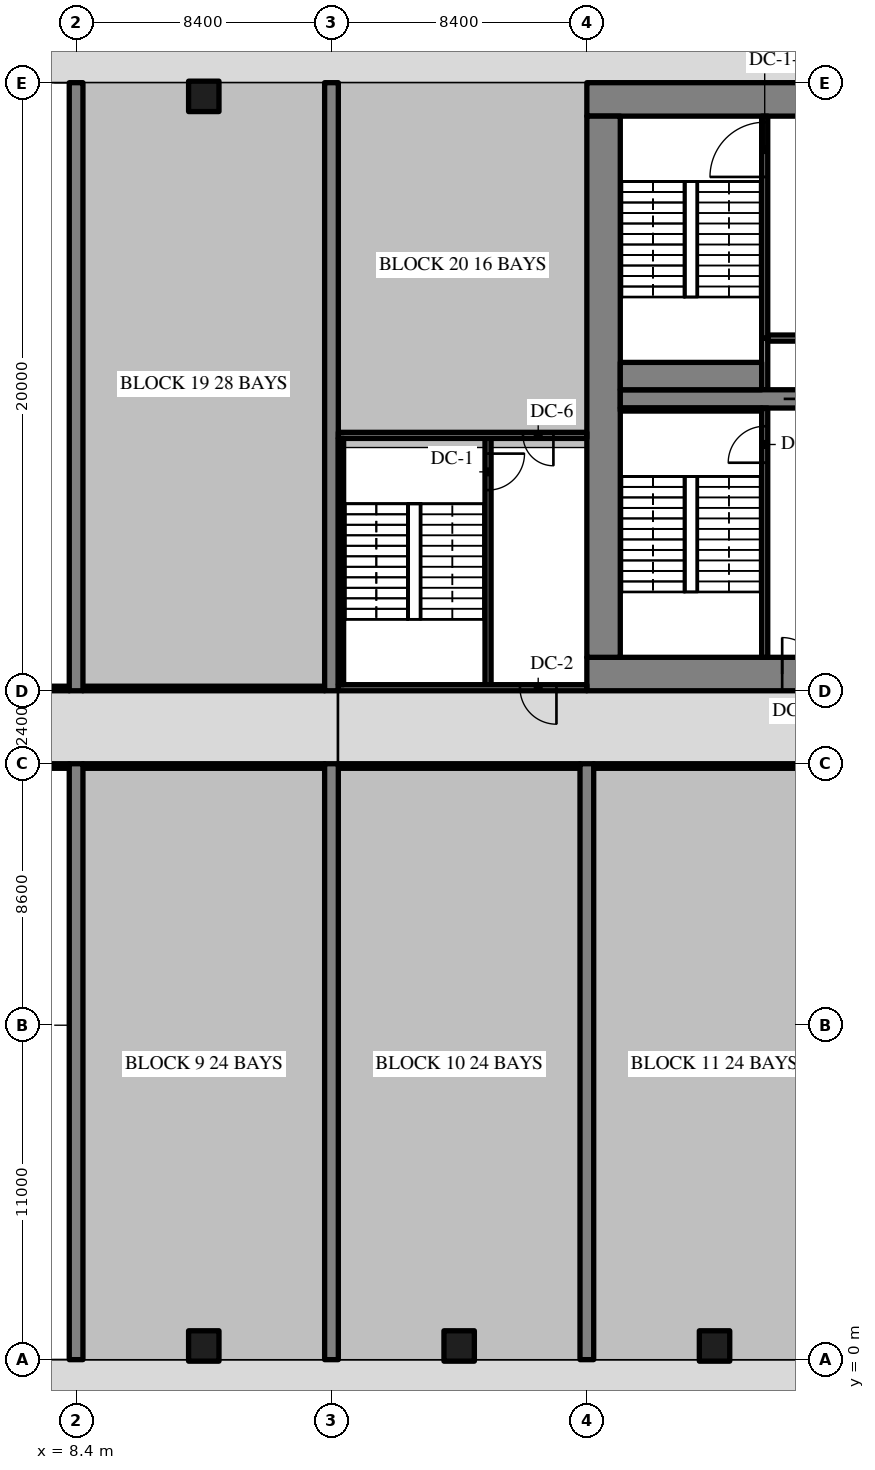
"""IFC4 building model, lengths in metres.
Left out: names, types, materials, properties, quantities, classifications, styles, units other than length and angle.
Written with IfcOpenShell. Run it as: python <this file> out.ifc"""

import sys

from ifc_helpers import new_model, si_unit, direction, frame, frame_2d, origin, origin_2d, place, context, subcontext, project, spatial, rectangle, extrude, source, transform, mapped, element, fill, save


model = new_model("IFC4")
c1 = context("Model", 3, precision=1e-05, world=origin(), true_north=direction((0.0, 1.0)))
c2 = subcontext(c1, "Body", "Model", "MODEL_VIEW")
j1 = project(units=[si_unit("LENGTHUNIT", "METRE"), si_unit("PLANEANGLEUNIT", "RADIAN")], contexts=[c1])
p1 = place(None, origin())
s1 = spatial("IfcSite", under=j1, at=p1, CompositionType="ELEMENT")
p2 = place(p1, origin())
s2 = spatial("IfcBuilding", under=s1, at=p2, CompositionType="ELEMENT")
p3 = place(p2, frame((0.0, 0.0, -9.0)))
s3 = spatial("IfcBuildingStorey", under=s2, at=p3, CompositionType="ELEMENT", Elevation=-9.0)
m1 = source(origin(), c2, "Body", "SweptSolid", [
    extrude(rectangle(XDim=50.4, YDim=1.1, at=frame_2d((25.2, 0.0))), origin(), (0.0, 0.0, 1.0), 4.22),
])
p4 = place(p3, frame((25.2, 22.55, 0.0), z_axis=(0.0, 0.0, 1.0), x_axis=(1.0, 0.0, 0.0)))
e1 = element("IfcWall", 1, at=p4, inside=s3, PredefinedType="SHEAR", context=c2, shape_type="MappedRepresentation", body=[
    mapped(m1, transform((0.0, 0.0, 0.0), scale=1.0)),
])
m2 = source(origin(), c2, "Body", "SweptSolid", [
    extrude(rectangle(XDim=1.8, YDim=2.1, at=frame_2d((0.9, 1.05))), frame((0.0, 0.56, 0.0), z_axis=(0.0, -1.0, 0.0), x_axis=(1.0, 0.0, 0.0)), (0.0, 0.0, 1.0), 1.12),
])
p5 = place(p4, frame((15.9, 0.0, 0.0)))
e2 = element("IfcOpeningElement", 2, at=p5, cuts=e1, PredefinedType="OPENING", context=c2, shape_type="MappedRepresentation", body=[
    mapped(m2, transform((0.0, 0.0, 0.0), scale=1.0)),
])
m3 = source(origin(), c2, "Body", "SweptSolid", [
    extrude(rectangle(XDim=1.2, YDim=2.1, at=frame_2d((0.6, 1.05))), frame((0.0, 0.56, 0.0), z_axis=(0.0, -1.0, 0.0), x_axis=(1.0, 0.0, 0.0)), (0.0, 0.0, 1.0), 1.12),
])
p6 = place(p4, frame((27.0, 0.0, 0.0)))
e3 = element("IfcOpeningElement", 3, at=p6, cuts=e1, PredefinedType="OPENING", context=c2, shape_type="MappedRepresentation", body=[
    mapped(m3, transform((0.0, 0.0, 0.0), scale=1.0)),
])
m4 = source(origin(), c2, "Body", "SweptSolid", [
    extrude(rectangle(XDim=0.9, YDim=2.1, at=frame_2d((0.45, 1.05))), frame((0.0, 0.56, 0.0), z_axis=(0.0, -1.0, 0.0), x_axis=(1.0, 0.0, 0.0)), (0.0, 0.0, 1.0), 1.12),
])
p7 = place(p4, frame((33.75, 0.0, 0.0)))
e4 = element("IfcOpeningElement", 4, at=p7, cuts=e1, PredefinedType="OPENING", context=c2, shape_type="MappedRepresentation", body=[
    mapped(m4, transform((0.0, 0.0, 0.0), scale=1.0)),
])
p8 = place(p4, frame((30.75, 0.0, 0.0)))
e5 = element("IfcOpeningElement", 5, at=p8, cuts=e1, PredefinedType="OPENING", context=c2, shape_type="MappedRepresentation", body=[
    mapped(m4, transform((0.0, 0.0, 0.0), scale=1.0)),
])
p9 = place(p4, frame((38.25, 0.0, 0.0)))
e6 = element("IfcOpeningElement", 6, at=p9, cuts=e1, PredefinedType="OPENING", context=c2, shape_type="MappedRepresentation", body=[
    mapped(m4, transform((0.0, 0.0, 0.0), scale=1.0)),
])
p10 = place(p4, frame((6.425, 0.0, 0.0)))
e7 = element("IfcOpeningElement", 7, at=p10, cuts=e1, PredefinedType="OPENING", context=c2, shape_type="MappedRepresentation", body=[
    mapped(m3, transform((0.0, 0.0, 0.0), scale=1.0)),
])
p11 = place(p4, frame((47.675, 0.0, 0.0)))
e8 = element("IfcOpeningElement", 8, at=p11, cuts=e1, PredefinedType="OPENING", context=c2, shape_type="MappedRepresentation", body=[
    mapped(m3, transform((0.0, 0.0, 0.0), scale=1.0)),
])
p12 = place(p3, frame((25.2, 41.45, 0.0), z_axis=(0.0, 0.0, 1.0), x_axis=(1.0, 0.0, 0.0)))
e9 = element("IfcWall", 9, at=p12, inside=s3, PredefinedType="SHEAR", context=c2, shape_type="MappedRepresentation", body=[
    mapped(m1, transform((0.0, 0.0, 0.0), scale=1.0)),
])
m5 = source(origin(), c2, "Body", "SweptSolid", [
    extrude(rectangle(XDim=17.8, YDim=1.1, at=frame_2d((8.9, 0.0))), origin(), (0.0, 0.0, 1.0), 4.22),
])
p13 = place(p3, frame((25.75, 23.1, 0.0), z_axis=(0.0, 0.0, 1.0), x_axis=(0.0, 1.0, 0.0)))
e10 = element("IfcWall", 10, at=p13, inside=s3, PredefinedType="SHEAR", context=c2, shape_type="MappedRepresentation", body=[
    mapped(m5, transform((0.0, 0.0, 0.0), scale=1.0)),
])
m6 = source(origin(), c2, "Body", "SweptSolid", [
    extrude(rectangle(XDim=7.0, YDim=0.6, at=frame_2d((3.5, 0.0))), origin(), (0.0, 0.0, 1.0), 4.22),
])
p14 = place(p3, frame((26.3, 31.6, 0.0), z_axis=(0.0, 0.0, 1.0), x_axis=(1.0, 0.0, 0.0)))
e11 = element("IfcWall", 11, at=p14, inside=s3, PredefinedType="SHEAR", context=c2, shape_type="MappedRepresentation", body=[
    mapped(m6, transform((0.0, 0.0, 0.0), scale=1.0)),
])
m7 = source(origin(), c2, "Body", "SweptSolid", [
    extrude(rectangle(XDim=1.1, YDim=2.1, at=frame_2d((0.55, 1.05))), frame((0.0, 0.31, 0.0), z_axis=(0.0, -1.0, 0.0), x_axis=(1.0, 0.0, 0.0)), (0.0, 0.0, 1.0), 0.62),
])
p15 = place(p14, frame((5.375, 0.0, 0.0)))
e12 = element("IfcOpeningElement", 12, at=p15, cuts=e11, PredefinedType="OPENING", context=c2, shape_type="MappedRepresentation", body=[
    mapped(m7, transform((0.0, 0.0, 0.0), scale=1.0)),
])
m8 = source(origin(), c2, "Body", "SweptSolid", [
    extrude(rectangle(XDim=19.6, YDim=0.45, at=frame_2d((9.8, 0.0))), origin(), (0.0, 0.0, 1.0), 4.22),
])
p16 = place(p3, frame((8.4, 0.0, 0.0), z_axis=(0.0, 0.0, 1.0), x_axis=(0.0, 1.0, 0.0)))
e13 = element("IfcWall", 13, at=p16, inside=s3, PredefinedType="SHEAR", context=c2, shape_type="MappedRepresentation", body=[
    mapped(m8, transform((0.0, 0.0, 0.0), scale=1.0)),
])
m9 = source(origin(), c2, "Body", "SweptSolid", [
    extrude(rectangle(XDim=20.0, YDim=0.45, at=frame_2d((10.0, 0.0))), origin(), (0.0, 0.0, 1.0), 4.22),
])
p17 = place(p3, frame((8.4, 22.0, 0.0), z_axis=(0.0, 0.0, 1.0), x_axis=(0.0, 1.0, 0.0)))
e14 = element("IfcWall", 14, at=p17, inside=s3, PredefinedType="SHEAR", context=c2, shape_type="MappedRepresentation", body=[
    mapped(m9, transform((0.0, 0.0, 0.0), scale=1.0)),
])
p18 = place(p3, frame((16.8, 0.0, 0.0), z_axis=(0.0, 0.0, 1.0), x_axis=(0.0, 1.0, 0.0)))
e15 = element("IfcWall", 15, at=p18, inside=s3, PredefinedType="SHEAR", context=c2, shape_type="MappedRepresentation", body=[
    mapped(m8, transform((0.0, 0.0, 0.0), scale=1.0)),
])
p19 = place(p3, frame((16.8, 22.0, 0.0), z_axis=(0.0, 0.0, 1.0), x_axis=(0.0, 1.0, 0.0)))
e16 = element("IfcWall", 16, at=p19, inside=s3, PredefinedType="SHEAR", context=c2, shape_type="MappedRepresentation", body=[
    mapped(m9, transform((0.0, 0.0, 0.0), scale=1.0)),
])
p20 = place(p3, frame((25.2, 0.0, 0.0), z_axis=(0.0, 0.0, 1.0), x_axis=(0.0, 1.0, 0.0)))
e17 = element("IfcWall", 17, at=p20, inside=s3, PredefinedType="SHEAR", context=c2, shape_type="MappedRepresentation", body=[
    mapped(m8, transform((0.0, 0.0, 0.0), scale=1.0)),
])
m10 = source(origin(), c2, "Body", "SweptSolid", [
    extrude(rectangle(XDim=1.0, YDim=1.0, at=origin_2d()), origin(), (0.0, 0.0, 1.0), 4.22),
])
for number, where, z_axis, x_axis in (
    (18, (12.6, 0.45, 0.0), (0.0, 0.0, 1.0), (1.0, 0.0, 0.0)),
    (19, (21.0, 0.45, 0.0), (0.0, 0.0, 1.0), (1.0, 0.0, 0.0)),
    (20, (29.4, 0.45, 0.0), (0.0, 0.0, 1.0), (1.0, 0.0, 0.0)),
    (21, (12.6, 41.55, 0.0), (0.0, 0.0, 1.0), (1.0, 0.0, 0.0)),
):
    element("IfcColumn", number, at=place(p3, frame(where, z_axis=z_axis, x_axis=x_axis)), inside=s3, PredefinedType="COLUMN", context=c2, shape_type="MappedRepresentation", body=[
        mapped(m10, transform((0.0, 0.0, 0.0), scale=1.0)),
    ])
m11 = source(origin(), c2, "Body", "SweptSolid", [
    extrude(rectangle(XDim=8.2, YDim=0.2, at=frame_2d((4.1, 0.0))), origin(), (0.0, 0.0, 1.0), 4.22),
])
p21 = place(p3, frame((31.05, 23.1, 0.0), z_axis=(0.0, 0.0, 1.0), x_axis=(0.0, 1.0, 0.0)))
e22 = element("IfcWall", 22, at=p21, inside=s3, PredefinedType="SOLIDWALL", context=c2, shape_type="MappedRepresentation", body=[
    mapped(m11, transform((0.0, 0.0, 0.0), scale=1.0)),
])
m12 = source(origin(), c2, "Body", "SweptSolid", [
    extrude(rectangle(XDim=1.2, YDim=2.1, at=frame_2d((0.6, 1.05))), frame((0.0, 0.11, 0.0), z_axis=(0.0, -1.0, 0.0), x_axis=(1.0, 0.0, 0.0)), (0.0, 0.0, 1.0), 0.22),
])
p22 = place(p21, frame((6.4, 0.0, 0.0)))
e23 = element("IfcOpeningElement", 23, at=p22, cuts=e22, PredefinedType="OPENING", context=c2, shape_type="MappedRepresentation", body=[
    mapped(m12, transform((0.0, 0.0, 0.0), scale=1.0)),
])
m13 = source(origin(), c2, "Body", "SweptSolid", [
    extrude(rectangle(XDim=1.7, YDim=0.2, at=frame_2d((0.85, 0.0))), origin(), (0.0, 0.0, 1.0), 4.22),
])
p23 = place(p3, frame((31.05, 31.9, 0.0), z_axis=(0.0, 0.0, 1.0), x_axis=(0.0, 1.0, 0.0)))
e24 = element("IfcWall", 24, at=p23, inside=s3, PredefinedType="SOLIDWALL", context=c2, shape_type="MappedRepresentation", body=[
    mapped(m13, transform((0.0, 0.0, 0.0), scale=1.0)),
])
m14 = source(origin(), c2, "Body", "SweptSolid", [
    extrude(rectangle(XDim=2.15, YDim=0.2, at=frame_2d((1.075, 0.0))), origin(), (0.0, 0.0, 1.0), 4.22),
])
p24 = place(p3, frame((31.15, 33.6, 0.0), z_axis=(0.0, 0.0, 1.0), x_axis=(1.0, 0.0, 0.0)))
e25 = element("IfcWall", 25, at=p24, inside=s3, PredefinedType="SOLIDWALL", context=c2, shape_type="MappedRepresentation", body=[
    mapped(m14, transform((0.0, 0.0, 0.0), scale=1.0)),
])
m15 = source(origin(), c2, "Body", "SweptSolid", [
    extrude(rectangle(XDim=7.3, YDim=0.2, at=frame_2d((3.65, 0.0))), origin(), (0.0, 0.0, 1.0), 4.22),
])
p25 = place(p3, frame((31.05, 33.6, 0.0), z_axis=(0.0, 0.0, 1.0), x_axis=(0.0, 1.0, 0.0)))
e26 = element("IfcWall", 26, at=p25, inside=s3, PredefinedType="SOLIDWALL", context=c2, shape_type="MappedRepresentation", body=[
    mapped(m15, transform((0.0, 0.0, 0.0), scale=1.0)),
])
m16 = source(origin(), c2, "Body", "SweptSolid", [
    extrude(rectangle(XDim=1.8, YDim=2.1, at=frame_2d((0.9, 1.05))), frame((0.0, 0.11, 0.0), z_axis=(0.0, -1.0, 0.0), x_axis=(1.0, 0.0, 0.0)), (0.0, 0.0, 1.0), 0.22),
])
p26 = place(p25, frame((5.3, 0.0, 0.0)))
e27 = element("IfcOpeningElement", 27, at=p26, cuts=e26, PredefinedType="OPENING", context=c2, shape_type="MappedRepresentation", body=[
    mapped(m16, transform((0.0, 0.0, 0.0), scale=1.0)),
])
m17 = source(origin(), c2, "Body", "SweptSolid", [
    extrude(rectangle(XDim=8.3, YDim=0.2, at=frame_2d((4.15, 0.0))), origin(), (0.0, 0.0, 1.0), 4.22),
])
p27 = place(p3, frame((21.95, 22.1, 0.0), z_axis=(0.0, 0.0, 1.0), x_axis=(0.0, 1.0, 0.0)))
e28 = element("IfcWall", 28, at=p27, inside=s3, PredefinedType="SOLIDWALL", context=c2, shape_type="MappedRepresentation", body=[
    mapped(m17, transform((0.0, 0.0, 0.0), scale=1.0)),
])
p28 = place(p27, frame((6.5, 0.0, 0.0)))
e29 = element("IfcOpeningElement", 29, at=p28, cuts=e28, PredefinedType="OPENING", context=c2, shape_type="MappedRepresentation", body=[
    mapped(m12, transform((0.0, 0.0, 0.0), scale=1.0)),
])
m18 = source(origin(), c2, "Body", "SweptSolid", [
    extrude(rectangle(XDim=8.175, YDim=0.2, at=frame_2d((4.087, 0.0))), origin(), (0.0, 0.0, 1.0), 4.22),
])
p29 = place(p3, frame((17.025, 22.1, 0.0), z_axis=(0.0, 0.0, 1.0), x_axis=(1.0, 0.0, 0.0)))
e30 = element("IfcWall", 30, at=p29, inside=s3, PredefinedType="SOLIDWALL", context=c2, shape_type="MappedRepresentation", body=[
    mapped(m18, transform((0.0, 0.0, 0.0), scale=1.0)),
])
p30 = place(p29, frame((5.975, 0.0, 0.0)))
e31 = element("IfcOpeningElement", 31, at=p30, cuts=e30, PredefinedType="OPENING", context=c2, shape_type="MappedRepresentation", body=[
    mapped(m12, transform((0.0, 0.0, 0.0), scale=1.0)),
])
p31 = place(p3, frame((17.025, 30.4, 0.0), z_axis=(0.0, 0.0, 1.0), x_axis=(1.0, 0.0, 0.0)))
e32 = element("IfcWall", 32, at=p31, inside=s3, PredefinedType="SOLIDWALL", context=c2, shape_type="MappedRepresentation", body=[
    mapped(m18, transform((0.0, 0.0, 0.0), scale=1.0)),
])
m19 = source(origin(), c2, "Body", "SweptSolid", [
    extrude(rectangle(XDim=1.0, YDim=2.1, at=frame_2d((0.5, 1.05))), frame((0.0, 0.11, 0.0), z_axis=(0.0, -1.0, 0.0), x_axis=(1.0, 0.0, 0.0)), (0.0, 0.0, 1.0), 0.22),
])
p32 = place(p31, frame((6.075, 0.0, 0.0)))
e33 = element("IfcOpeningElement", 33, at=p32, cuts=e32, PredefinedType="OPENING", context=c2, shape_type="MappedRepresentation", body=[
    mapped(m19, transform((0.0, 0.0, 0.0), scale=1.0)),
])
m20 = source(origin(), c2, "Body", "SweptSolid", [
    extrude(rectangle(XDim=4.65, YDim=0.1, at=frame_2d((2.325, 0.0))), origin(), (0.0, 0.0, 1.0), 4.22),
])
p33 = place(p3, frame((26.3, 31.25, 0.0), z_axis=(0.0, 0.0, 1.0), x_axis=(1.0, 0.0, 0.0)))
e34 = element("IfcWall", 34, at=p33, inside=s3, PredefinedType="SOLIDWALL", context=c2, shape_type="MappedRepresentation", body=[
    mapped(m20, transform((0.0, 0.0, 0.0), scale=1.0)),
])
m21 = source(origin(), c2, "Body", "SweptSolid", [
    extrude(rectangle(XDim=8.1, YDim=0.175, at=frame_2d((4.05, 0.0))), origin(), (0.0, 0.0, 1.0), 4.22),
])
p34 = place(p3, frame((17.112, 22.2, 0.0), z_axis=(0.0, 0.0, 1.0), x_axis=(0.0, 1.0, 0.0)))
e35 = element("IfcWall", 35, at=p34, inside=s3, PredefinedType="SOLIDWALL", context=c2, shape_type="MappedRepresentation", body=[
    mapped(m21, transform((0.0, 0.0, 0.0), scale=1.0)),
])
m22 = source(origin(), c2, "Body", "SweptSolid", [
    extrude(rectangle(XDim=4.65, YDim=0.9, at=frame_2d((2.325, 0.0))), origin(), (0.0, 0.0, 1.0), 4.22),
])
p35 = place(p3, frame((26.3, 32.35, 0.0), z_axis=(0.0, 0.0, 1.0), x_axis=(1.0, 0.0, 0.0)))
e36 = element("IfcWall", 36, at=p35, inside=s3, PredefinedType="SOLIDWALL", context=c2, shape_type="MappedRepresentation", body=[
    mapped(m22, transform((0.0, 0.0, 0.0), scale=1.0)),
])
m23 = source(origin(), c2, "Body", "SweptSolid", [
    extrude(rectangle(XDim=7.725, YDim=0.15, at=frame_2d((3.863, 0.0))), origin(), (0.0, 0.0, 1.0), 4.22),
])
for number, where, z_axis, x_axis in (
    (37, (0.45, 19.525, 0.0), (0.0, 0.0, 1.0), (1.0, 0.0, 0.0)),
    (38, (0.45, 22.075, 0.0), (0.0, 0.0, 1.0), (1.0, 0.0, 0.0)),
):
    element("IfcWall", number, at=place(p3, frame(where, z_axis=z_axis, x_axis=x_axis)), inside=s3, PredefinedType="PARTITIONING", context=c2, shape_type="MappedRepresentation", body=[
        mapped(m23, transform((0.0, 0.0, 0.0), scale=1.0)),
    ])
m24 = source(origin(), c2, "Body", "SweptSolid", [
    extrude(rectangle(XDim=7.95, YDim=0.15, at=frame_2d((3.975, 0.0))), origin(), (0.0, 0.0, 1.0), 4.22),
])
for number, where, z_axis, x_axis in (
    (39, (8.625, 19.525, 0.0), (0.0, 0.0, 1.0), (1.0, 0.0, 0.0)),
    (40, (8.625, 22.075, 0.0), (0.0, 0.0, 1.0), (1.0, 0.0, 0.0)),
):
    element("IfcWall", number, at=place(p3, frame(where, z_axis=z_axis, x_axis=x_axis)), inside=s3, PredefinedType="PARTITIONING", context=c2, shape_type="MappedRepresentation", body=[
        mapped(m24, transform((0.0, 0.0, 0.0), scale=1.0)),
    ])
m25 = source(origin(), c2, "Body", "SweptSolid", [
    extrude(rectangle(XDim=7.95, YDim=0.15, at=frame_2d((3.975, 0.0))), origin(), (0.0, 0.0, 1.0), 4.22),
])
p36 = place(p3, frame((17.025, 19.525, 0.0), z_axis=(0.0, 0.0, 1.0), x_axis=(1.0, 0.0, 0.0)))
e41 = element("IfcWall", 41, at=p36, inside=s3, PredefinedType="PARTITIONING", context=c2, shape_type="MappedRepresentation", body=[
    mapped(m25, transform((0.0, 0.0, 0.0), scale=1.0)),
])
p37 = place(p3, frame((25.425, 19.525, 0.0), z_axis=(0.0, 0.0, 1.0), x_axis=(1.0, 0.0, 0.0)))
e42 = element("IfcWall", 42, at=p37, inside=s3, PredefinedType="PARTITIONING", context=c2, shape_type="MappedRepresentation", body=[
    mapped(m24, transform((0.0, 0.0, 0.0), scale=1.0)),
])
m26 = source(origin(), c2, "Body", "SweptSolid", [
    extrude(rectangle(XDim=1.2, YDim=2.1, at=frame_2d((0.6, 1.05))), frame((0.0, 0.025, 0.0), z_axis=(0.0, -1.0, 0.0), x_axis=(1.0, 0.0, 0.0)), (0.0, 0.0, 1.0), 0.05),
])
p38 = place(p22, origin())
e43 = element("IfcDoor", 43, at=p38, inside=s3, OperationType="SINGLE_SWING_LEFT", PredefinedType="DOOR", context=c2, shape_type="MappedRepresentation", body=[
    mapped(m26, transform((0.0, 0.0, 0.0), scale=1.0)),
])
fill(e23, e43)
m27 = source(origin(), c2, "Body", "SweptSolid", [
    extrude(rectangle(XDim=1.2, YDim=2.1, at=frame_2d((0.6, 1.05))), frame((0.0, 0.325, 0.0), z_axis=(0.0, -1.0, 0.0), x_axis=(1.0, 0.0, 0.0)), (0.0, 0.0, 1.0), 0.05),
])
p39 = place(p10, origin())
e44 = element("IfcDoor", 44, at=p39, inside=s3, OperationType="SINGLE_SWING_LEFT", PredefinedType="DOOR", context=c2, shape_type="MappedRepresentation", body=[
    mapped(m27, transform((0.0, 0.0, 0.0), scale=1.0)),
])
fill(e7, e44)
m28 = source(origin(), c2, "Body", "SweptSolid", [
    extrude(rectangle(XDim=1.1, YDim=2.1, at=frame_2d((0.55, 1.05))), frame((0.0, 0.025, 0.0), z_axis=(0.0, -1.0, 0.0), x_axis=(1.0, 0.0, 0.0)), (0.0, 0.0, 1.0), 0.05),
])
p40 = place(p15, origin())
e45 = element("IfcDoor", 45, at=p40, inside=s3, OperationType="SLIDING_TO_RIGHT", PredefinedType="DOOR", context=c2, shape_type="MappedRepresentation", body=[
    mapped(m28, transform((0.0, 0.0, 0.0), scale=1.0)),
])
fill(e12, e45)
m29 = source(origin(), c2, "Body", "SweptSolid", [
    extrude(rectangle(XDim=1.8, YDim=2.1, at=frame_2d((0.9, 1.05))), frame((0.0, 0.025, 0.0), z_axis=(0.0, -1.0, 0.0), x_axis=(1.0, 0.0, 0.0)), (0.0, 0.0, 1.0), 0.05),
])
p41 = place(p26, origin())
e46 = element("IfcDoor", 46, at=p41, inside=s3, OperationType="SINGLE_SWING_LEFT", PredefinedType="DOOR", context=c2, shape_type="MappedRepresentation", body=[
    mapped(m29, transform((0.0, 0.0, 0.0), scale=1.0)),
])
fill(e27, e46)
p42 = place(p28, origin())
e47 = element("IfcDoor", 47, at=p42, inside=s3, OperationType="SINGLE_SWING_RIGHT", PredefinedType="DOOR", context=c2, shape_type="MappedRepresentation", body=[
    mapped(m26, transform((0.0, 0.0, 0.0), scale=1.0)),
])
fill(e29, e47)
p43 = place(p30, origin())
e48 = element("IfcDoor", 48, at=p43, inside=s3, OperationType="SINGLE_SWING_RIGHT", PredefinedType="DOOR", context=c2, shape_type="MappedRepresentation", body=[
    mapped(m26, transform((0.0, 0.0, 0.0), scale=1.0)),
])
fill(e31, e48)
m30 = source(origin(), c2, "Body", "SweptSolid", [
    extrude(rectangle(XDim=1.0, YDim=2.1, at=frame_2d((0.5, 1.05))), frame((0.0, 0.025, 0.0), z_axis=(0.0, -1.0, 0.0), x_axis=(1.0, 0.0, 0.0)), (0.0, 0.0, 1.0), 0.05),
])
p44 = place(p32, origin())
e49 = element("IfcDoor", 49, at=p44, inside=s3, OperationType="SINGLE_SWING_RIGHT", PredefinedType="DOOR", context=c2, shape_type="MappedRepresentation", body=[
    mapped(m30, transform((0.0, 0.0, 0.0), scale=1.0)),
])
fill(e33, e49)
save(model, sys.argv[1])
